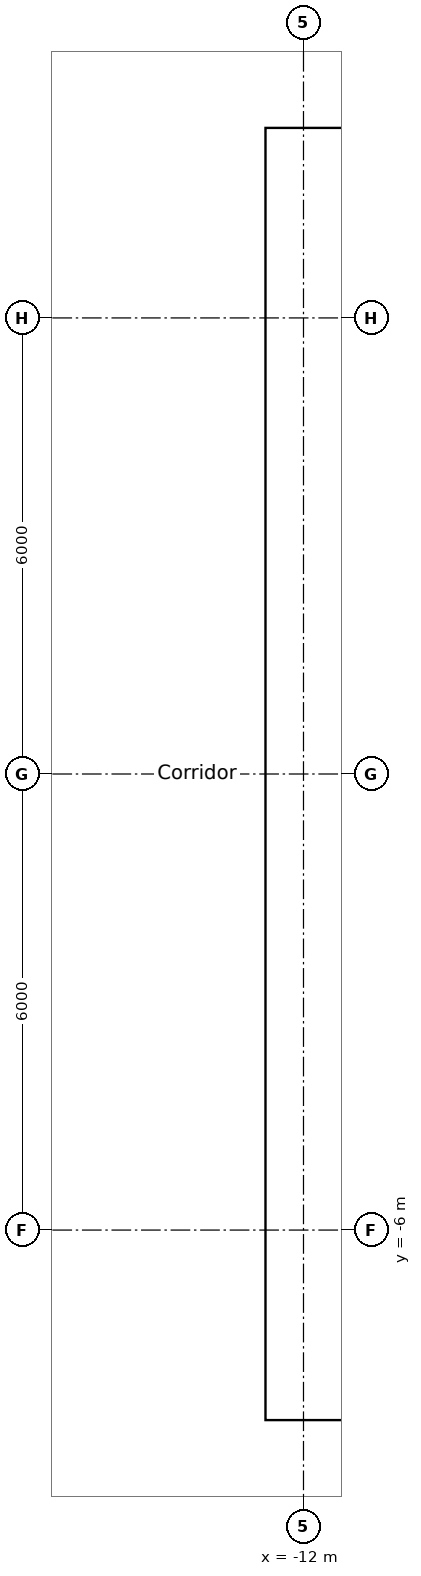
"""IFC4 building model, lengths in metres.
Left out: names, types, materials, properties, quantities, classifications, styles, units other than length and angle.
Written with IfcOpenShell. Run it as: python <this file> out.ifc"""

import sys

from ifc_helpers import new_model, si_unit, direction, frame, frame_2d, origin, place, context, subcontext, project, spatial, rectangle, extrude, element, fill, save


model = new_model("IFC4")
c1 = context("Model", 3, precision=1e-05, world=origin(), true_north=direction((0.0, 1.0)))
c2 = subcontext(c1, "Body", "Model", "MODEL_VIEW")
j1 = project(units=[si_unit("LENGTHUNIT", "METRE"), si_unit("PLANEANGLEUNIT", "RADIAN")], contexts=[c1])
p1 = place(None, origin())
s1 = spatial("IfcSite", under=j1, at=p1, CompositionType="ELEMENT")
p2 = place(p1, origin())
s2 = spatial("IfcBuilding", under=s1, at=p2, CompositionType="ELEMENT")
p3 = place(p2, frame((0.0, 0.0, 180.0)))
s3 = spatial("IfcBuildingStorey", under=s2, at=p3, CompositionType="ELEMENT", Elevation=180.0)
p4 = place(p3, frame((-12.5, -8.05, 0.0), z_axis=(0.0, 0.0, 1.0), x_axis=(1.0, 0.0, 0.0)))
e1 = element("IfcWall", 1, at=p4, inside=s3, PredefinedType="SOLIDWALL", context=c2, shape_type="SweptSolid", body=[
    extrude(rectangle(XDim=25.0, YDim=0.9, at=frame_2d((12.5, 0.0))), origin(), (0.0, 0.0, 1.0), 3.6),
])
p5 = place(p4, frame((13.4, 0.0, 0.0)))
e2 = element("IfcOpeningElement", 2, at=p5, cuts=e1, PredefinedType="OPENING", context=c2, shape_type="SweptSolid", body=[
    extrude(rectangle(XDim=1.0, YDim=2.1, at=frame_2d((0.5, 1.05))), frame((0.0, 0.45, 0.0), z_axis=(0.0, -1.0, 0.0), x_axis=(1.0, 0.0, 0.0)), (0.0, 0.0, 1.0), 0.9),
])
p6 = place(p4, frame((8.3, 0.0, 0.0)))
e3 = element("IfcOpeningElement", 3, at=p6, cuts=e1, PredefinedType="OPENING", context=c2, shape_type="SweptSolid", body=[
    extrude(rectangle(XDim=1.8, YDim=2.1, at=frame_2d((0.9, 1.05))), frame((0.0, 0.45, 0.0), z_axis=(0.0, -1.0, 0.0), x_axis=(1.0, 0.0, 0.0)), (0.0, 0.0, 1.0), 0.9),
])
p7 = place(p4, frame((14.9, 0.0, 0.0)))
e4 = element("IfcOpeningElement", 4, at=p7, cuts=e1, PredefinedType="OPENING", context=c2, shape_type="SweptSolid", body=[
    extrude(rectangle(XDim=1.8, YDim=2.1, at=frame_2d((0.9, 1.05))), frame((0.0, 0.45, 0.0), z_axis=(0.0, -1.0, 0.0), x_axis=(1.0, 0.0, 0.0)), (0.0, 0.0, 1.0), 0.9),
])
p8 = place(p3, frame((-12.5, 8.05, 0.0), z_axis=(0.0, 0.0, 1.0), x_axis=(1.0, 0.0, 0.0)))
e5 = element("IfcWall", 5, at=p8, inside=s3, PredefinedType="SOLIDWALL", context=c2, shape_type="SweptSolid", body=[
    extrude(rectangle(XDim=25.0, YDim=0.9, at=frame_2d((12.5, 0.0))), origin(), (0.0, 0.0, 1.0), 3.6),
])
p9 = place(p8, frame((8.3, 0.0, 0.0)))
e6 = element("IfcOpeningElement", 6, at=p9, cuts=e5, PredefinedType="OPENING", context=c2, shape_type="SweptSolid", body=[
    extrude(rectangle(XDim=1.8, YDim=2.1, at=frame_2d((0.9, 1.05))), frame((0.0, 0.45, 0.0), z_axis=(0.0, -1.0, 0.0), x_axis=(1.0, 0.0, 0.0)), (0.0, 0.0, 1.0), 0.9),
])
p10 = place(p3, frame((-12.05, -7.6, 0.0), z_axis=(0.0, 0.0, 1.0), x_axis=(0.0, 1.0, 0.0)))
e7 = element("IfcWall", 7, at=p10, inside=s3, PredefinedType="SOLIDWALL", context=c2, shape_type="SweptSolid", body=[
    extrude(rectangle(XDim=15.2, YDim=0.9, at=frame_2d((7.6, 0.0))), origin(), (0.0, 0.0, 1.0), 3.6),
])
p11 = place(p10, frame((7.1, 0.0, 0.0)))
e8 = element("IfcOpeningElement", 8, at=p11, cuts=e7, PredefinedType="OPENING", context=c2, shape_type="SweptSolid", body=[
    extrude(rectangle(XDim=1.0, YDim=2.1, at=frame_2d((0.5, 1.05))), frame((0.0, 0.45, 0.0), z_axis=(0.0, -1.0, 0.0), x_axis=(1.0, 0.0, 0.0)), (0.0, 0.0, 1.0), 0.9),
])
p12 = place(p3, frame((-11.6, -4.55, 0.0), z_axis=(0.0, 0.0, 1.0), x_axis=(1.0, 0.0, 0.0)))
e9 = element("IfcWall", 9, at=p12, inside=s3, PredefinedType="SOLIDWALL", context=c2, shape_type="SweptSolid", body=[
    extrude(rectangle(XDim=2.4, YDim=0.3, at=frame_2d((1.2, 0.0))), origin(), (0.0, 0.0, 1.0), 3.3),
])
p13 = place(p12, frame((0.65, 0.0, 0.0)))
e10 = element("IfcOpeningElement", 10, at=p13, cuts=e9, PredefinedType="OPENING", context=c2, shape_type="SweptSolid", body=[
    extrude(rectangle(XDim=1.1, YDim=2.1, at=frame_2d((0.55, 1.05))), frame((0.0, 0.15, 0.0), z_axis=(0.0, -1.0, 0.0), x_axis=(1.0, 0.0, 0.0)), (0.0, 0.0, 1.0), 0.3),
])
p14 = place(p3, frame((-11.6, 4.55, 0.0), z_axis=(0.0, 0.0, 1.0), x_axis=(1.0, 0.0, 0.0)))
e11 = element("IfcWall", 11, at=p14, inside=s3, PredefinedType="SOLIDWALL", context=c2, shape_type="SweptSolid", body=[
    extrude(rectangle(XDim=2.4, YDim=0.3, at=frame_2d((1.2, 0.0))), origin(), (0.0, 0.0, 1.0), 3.3),
])
p15 = place(p14, frame((0.65, 0.0, 0.0)))
e12 = element("IfcOpeningElement", 12, at=p15, cuts=e11, PredefinedType="OPENING", context=c2, shape_type="SweptSolid", body=[
    extrude(rectangle(XDim=1.1, YDim=2.1, at=frame_2d((0.55, 1.05))), frame((0.0, 0.15, 0.0), z_axis=(0.0, -1.0, 0.0), x_axis=(1.0, 0.0, 0.0)), (0.0, 0.0, 1.0), 0.3),
])
p16 = place(p3, frame((-19.351, 4.586, 0.0), z_axis=(0.0, 0.0, 1.0), x_axis=(0.44867140262, 0.893696801198, 0.0)))
e13 = element("IfcWall", 13, at=p16, inside=s3, PredefinedType="PARTITIONING", context=c2, shape_type="SweptSolid", body=[
    extrude(rectangle(XDim=9.174, YDim=0.15, at=frame_2d((4.587, 0.0))), origin(), (0.0, 0.0, 1.0), 3.3),
])
p17 = place(p16, frame((0.615, 0.0, 0.0)))
e14 = element("IfcOpeningElement", 14, at=p17, cuts=e13, PredefinedType="OPENING", context=c2, shape_type="SweptSolid", body=[
    extrude(rectangle(XDim=1.1, YDim=2.1, at=frame_2d((0.55, 1.05))), frame((0.0, 0.075, 0.0), z_axis=(0.0, -1.0, 0.0), x_axis=(1.0, 0.0, 0.0)), (0.0, 0.0, 1.0), 0.15),
])
p18 = place(p3, frame((-18.688, -6.802, 0.0), z_axis=(0.0, 0.0, 1.0), x_axis=(0.499914202267, -0.866074933462, 0.0)))
e15 = element("IfcWall", 15, at=p18, inside=s3, PredefinedType="PARTITIONING", context=c2, shape_type="SweptSolid", body=[
    extrude(rectangle(XDim=6.907, YDim=0.15, at=frame_2d((3.454, 0.0))), origin(), (0.0, 0.0, 1.0), 3.3),
])
p19 = place(p18, frame((3.003, 0.0, 0.0)))
e16 = element("IfcOpeningElement", 16, at=p19, cuts=e15, PredefinedType="OPENING", context=c2, shape_type="SweptSolid", body=[
    extrude(rectangle(XDim=1.0, YDim=2.04, at=frame_2d((0.5, 1.02))), frame((0.0, 0.075, 0.0), z_axis=(0.0, -1.0, 0.0), x_axis=(1.0, 0.0, 0.0)), (0.0, 0.0, 1.0), 0.15),
])
p20 = place(p11, origin())
e17 = element("IfcDoor", 17, at=p20, inside=s3, OperationType="DOUBLE_DOOR_SINGLE_SWING", PredefinedType="DOOR", context=c2, shape_type="SweptSolid", body=[
    extrude(rectangle(XDim=1.0, YDim=2.1, at=frame_2d((0.5, 1.05))), frame((0.0, 0.025, 0.0), z_axis=(0.0, -1.0, 0.0), x_axis=(1.0, 0.0, 0.0)), (0.0, 0.0, 1.0), 0.05),
])
fill(e8, e17)
save(model, sys.argv[1])
